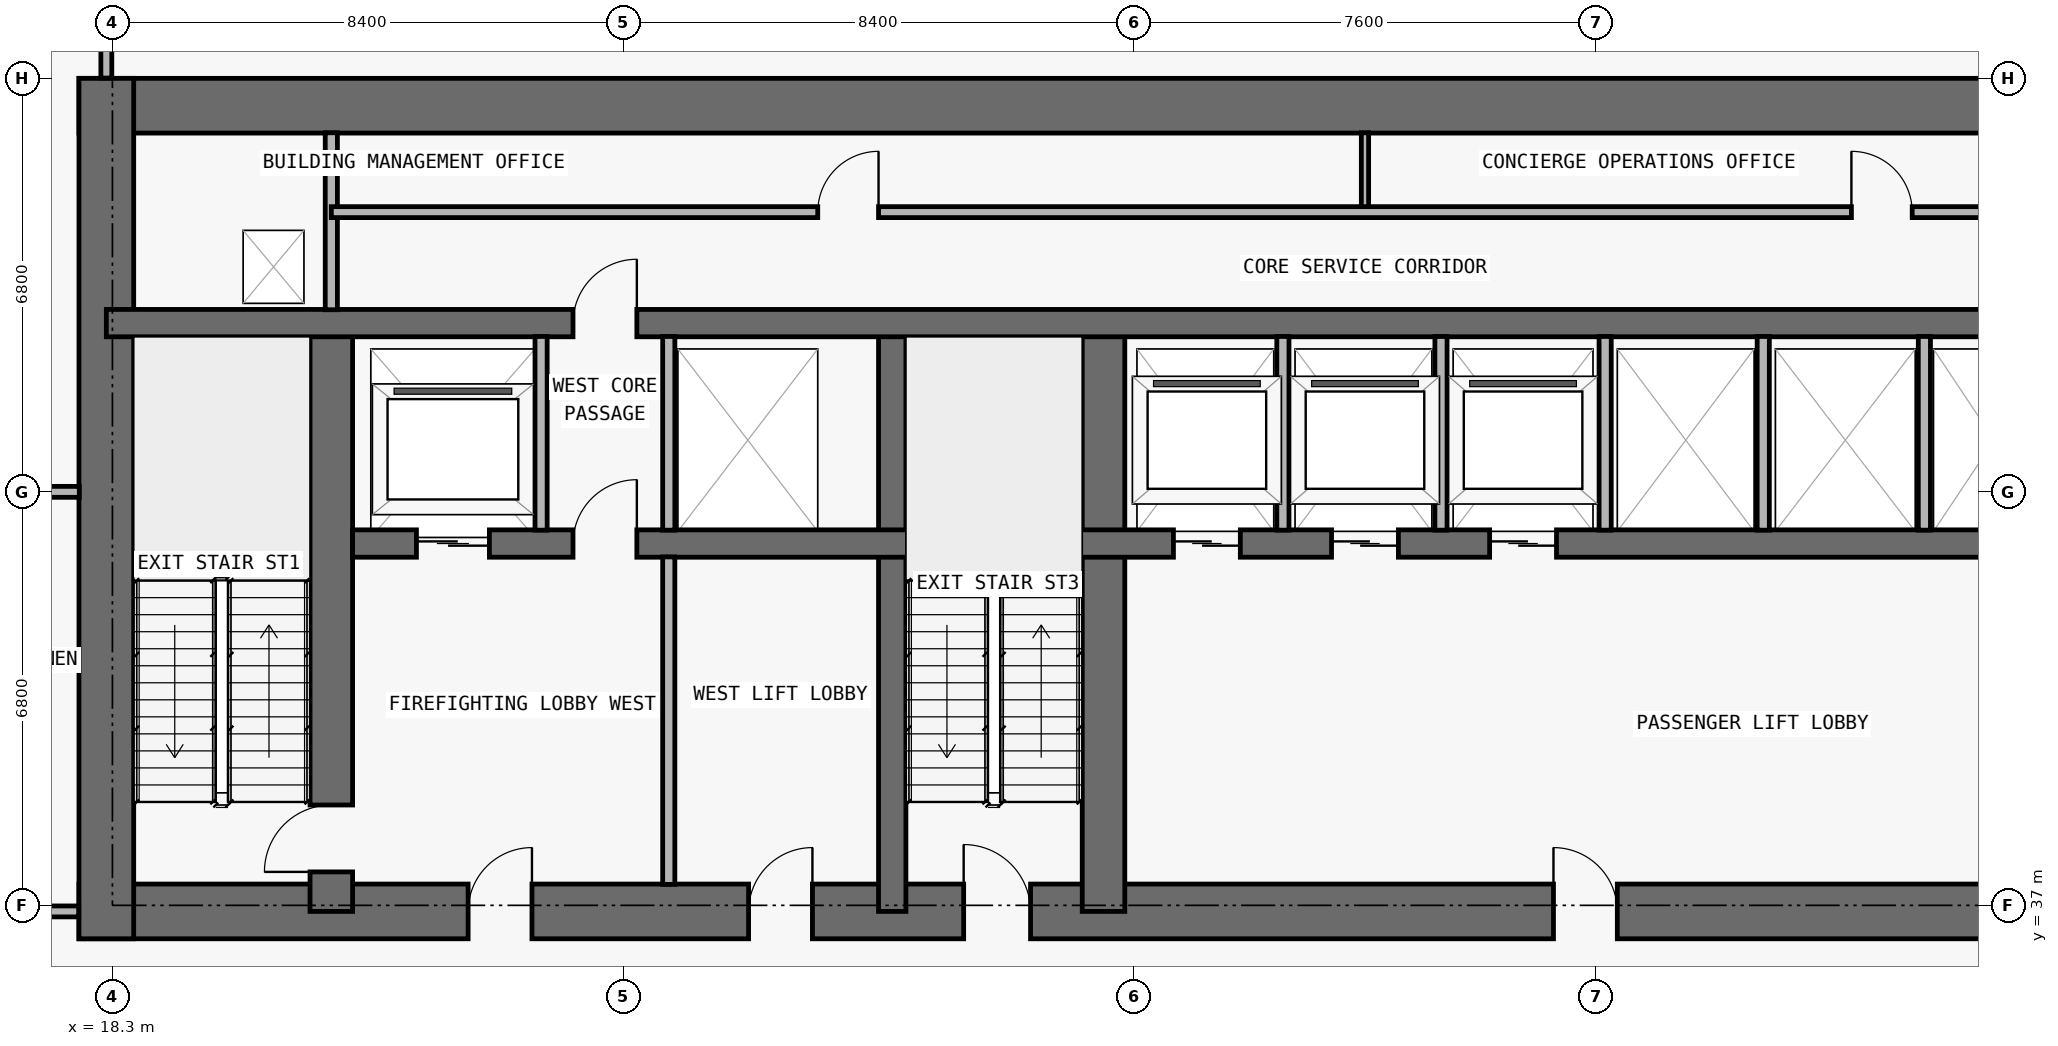
"""IFC4 building model, lengths in metres.
Left out: names, types, materials, properties, quantities, classifications, styles, units other than length and angle.
Written with IfcOpenShell. Run it as: python <this file> out.ifc"""

import sys

from ifc_helpers import new_model, si_unit, direction, frame, frame_2d, origin, place, context, subcontext, project, spatial, rectangle, extrude, element, fill, save


model = new_model("IFC4")
c1 = context("Model", 3, precision=1e-05, world=origin(), true_north=direction((0.0, 1.0)))
c2 = subcontext(c1, "Body", "Model", "MODEL_VIEW")
j1 = project(units=[si_unit("LENGTHUNIT", "METRE"), si_unit("PLANEANGLEUNIT", "RADIAN")], contexts=[c1])
p1 = place(None, origin())
s1 = spatial("IfcSite", under=j1, at=p1, CompositionType="ELEMENT")
p2 = place(p1, origin())
s2 = spatial("IfcBuilding", under=s1, at=p2, CompositionType="ELEMENT")
p3 = place(p2, frame((0.0, 0.0, 5.4)))
s3 = spatial("IfcBuildingStorey", under=s2, at=p3, CompositionType="ELEMENT", Elevation=5.4)
p4 = place(p3, frame((17.75, 36.9, 0.0), z_axis=(0.0, 0.0, 1.0), x_axis=(1.0, 0.0, 0.0)))
e1 = element("IfcWall", 1, at=p4, inside=s3, PredefinedType="SHEAR", context=c2, shape_type="SweptSolid", body=[
    extrude(rectangle(XDim=42.3, YDim=0.9, at=frame_2d((21.15, 0.0))), origin(), (0.0, 0.0, 1.0), 4.5),
])
p5 = place(p4, frame((14.55, 0.0, 0.0)))
e2 = element("IfcOpeningElement", 2, at=p5, cuts=e1, PredefinedType="OPENING", context=c2, shape_type="SweptSolid", body=[
    extrude(rectangle(XDim=1.1, YDim=2.15, at=frame_2d((0.55, 1.075))), frame((0.0, 0.46, 0.0), z_axis=(0.0, -1.0, 0.0), x_axis=(1.0, 0.0, 0.0)), (0.0, 0.0, 1.0), 0.92),
])
p6 = place(p4, frame((6.4, 0.0, 0.0)))
e3 = element("IfcOpeningElement", 3, at=p6, cuts=e1, PredefinedType="OPENING", context=c2, shape_type="SweptSolid", body=[
    extrude(rectangle(XDim=1.05, YDim=2.15, at=frame_2d((0.525, 1.075))), frame((0.0, 0.46, 0.0), z_axis=(0.0, -1.0, 0.0), x_axis=(1.0, 0.0, 0.0)), (0.0, 0.0, 1.0), 0.92),
])
p7 = place(p4, frame((34.9, 0.0, 0.0)))
e4 = element("IfcOpeningElement", 4, at=p7, cuts=e1, PredefinedType="OPENING", context=c2, shape_type="SweptSolid", body=[
    extrude(rectangle(XDim=1.05, YDim=2.15, at=frame_2d((0.525, 1.075))), frame((0.0, 0.46, 0.0), z_axis=(0.0, -1.0, 0.0), x_axis=(1.0, 0.0, 0.0)), (0.0, 0.0, 1.0), 0.92),
])
p8 = place(p4, frame((11.012, 0.0, 0.0)))
e5 = element("IfcOpeningElement", 5, at=p8, cuts=e1, PredefinedType="OPENING", context=c2, shape_type="SweptSolid", body=[
    extrude(rectangle(XDim=1.05, YDim=2.15, at=frame_2d((0.525, 1.075))), frame((0.0, 0.46, 0.0), z_axis=(0.0, -1.0, 0.0), x_axis=(1.0, 0.0, 0.0)), (0.0, 0.0, 1.0), 0.92),
])
p9 = place(p4, frame((24.25, 0.0, 0.0)))
e6 = element("IfcOpeningElement", 6, at=p9, cuts=e1, PredefinedType="OPENING", context=c2, shape_type="SweptSolid", body=[
    extrude(rectangle(XDim=1.05, YDim=2.15, at=frame_2d((0.525, 1.075))), frame((0.0, 0.46, 0.0), z_axis=(0.0, -1.0, 0.0), x_axis=(1.0, 0.0, 0.0)), (0.0, 0.0, 1.0), 0.92),
])
p10 = place(p3, frame((17.75, 50.15, 0.0), z_axis=(0.0, 0.0, 1.0), x_axis=(1.0, 0.0, 0.0)))
e7 = element("IfcWall", 7, at=p10, inside=s3, PredefinedType="SHEAR", context=c2, shape_type="SweptSolid", body=[
    extrude(rectangle(XDim=42.3, YDim=0.9, at=frame_2d((21.15, 0.0))), origin(), (0.0, 0.0, 1.0), 4.5),
])
p11 = place(p3, frame((18.2, 36.45, 0.0), z_axis=(0.0, 0.0, 1.0), x_axis=(0.0, 1.0, 0.0)))
e8 = element("IfcWall", 8, at=p11, inside=s3, PredefinedType="SHEAR", context=c2, shape_type="SweptSolid", body=[
    extrude(rectangle(XDim=14.15, YDim=0.9, at=frame_2d((7.075, 0.0))), origin(), (0.0, 0.0, 1.0), 4.5),
])
p12 = place(p3, frame((21.9, 36.9, 0.0), z_axis=(0.0, 0.0, 1.0), x_axis=(0.0, 1.0, 0.0)))
e9 = element("IfcWall", 9, at=p12, inside=s3, PredefinedType="SHEAR", context=c2, shape_type="SweptSolid", body=[
    extrude(rectangle(XDim=9.675, YDim=0.7, at=frame_2d((4.837, 0.0))), origin(), (0.0, 0.0, 1.0), 4.5),
])
p13 = place(p12, frame((0.65, 0.0, 0.0)))
e10 = element("IfcOpeningElement", 10, at=p13, cuts=e9, PredefinedType="OPENING", context=c2, shape_type="SweptSolid", body=[
    extrude(rectangle(XDim=1.1, YDim=2.15, at=frame_2d((0.55, 1.075))), frame((0.0, 0.36, 0.0), z_axis=(0.0, -1.0, 0.0), x_axis=(1.0, 0.0, 0.0)), (0.0, 0.0, 1.0), 0.72),
])
p14 = place(p3, frame((31.125, 36.9, 0.0), z_axis=(0.0, 0.0, 1.0), x_axis=(0.0, 1.0, 0.0)))
e11 = element("IfcWall", 11, at=p14, inside=s3, PredefinedType="SHEAR", context=c2, shape_type="SweptSolid", body=[
    extrude(rectangle(XDim=9.675, YDim=0.45, at=frame_2d((4.837, 0.0))), origin(), (0.0, 0.0, 1.0), 4.5),
])
p15 = place(p3, frame((34.6, 36.9, 0.0), z_axis=(0.0, 0.0, 1.0), x_axis=(0.0, 1.0, 0.0)))
e12 = element("IfcWall", 12, at=p15, inside=s3, PredefinedType="SHEAR", context=c2, shape_type="SweptSolid", body=[
    extrude(rectangle(XDim=9.675, YDim=0.7, at=frame_2d((4.837, 0.0))), origin(), (0.0, 0.0, 1.0), 4.5),
])
p16 = place(p3, frame((22.25, 42.95, 0.0), z_axis=(0.0, 0.0, 1.0), x_axis=(1.0, 0.0, 0.0)))
e13 = element("IfcWall", 13, at=p16, inside=s3, PredefinedType="SHEAR", context=c2, shape_type="SweptSolid", body=[
    extrude(rectangle(XDim=33.3, YDim=0.45, at=frame_2d((16.65, 0.0))), origin(), (0.0, 0.0, 1.0), 4.5),
])
p17 = place(p16, frame((1.05, 0.0, 0.0)))
e14 = element("IfcOpeningElement", 14, at=p17, cuts=e13, PredefinedType="OPENING", context=c2, shape_type="SweptSolid", body=[
    extrude(rectangle(XDim=1.2, YDim=2.2, at=frame_2d((0.6, 1.1))), frame((0.0, 0.235, 0.0), z_axis=(0.0, -1.0, 0.0), x_axis=(1.0, 0.0, 0.0)), (0.0, 0.0, 1.0), 0.47),
])
p18 = place(p16, frame((31.05, 0.0, 0.0)))
e15 = element("IfcOpeningElement", 15, at=p18, cuts=e13, PredefinedType="OPENING", context=c2, shape_type="SweptSolid", body=[
    extrude(rectangle(XDim=1.2, YDim=2.2, at=frame_2d((0.6, 1.1))), frame((0.0, 0.235, 0.0), z_axis=(0.0, -1.0, 0.0), x_axis=(1.0, 0.0, 0.0)), (0.0, 0.0, 1.0), 0.47),
])
p19 = place(p16, frame((13.5, 0.0, 0.0)))
e16 = element("IfcOpeningElement", 16, at=p19, cuts=e13, PredefinedType="OPENING", context=c2, shape_type="SweptSolid", body=[
    extrude(rectangle(XDim=1.1, YDim=2.2, at=frame_2d((0.55, 1.1))), frame((0.0, 0.235, 0.0), z_axis=(0.0, -1.0, 0.0), x_axis=(1.0, 0.0, 0.0)), (0.0, 0.0, 1.0), 0.47),
])
p20 = place(p16, frame((16.1, 0.0, 0.0)))
e17 = element("IfcOpeningElement", 17, at=p20, cuts=e13, PredefinedType="OPENING", context=c2, shape_type="SweptSolid", body=[
    extrude(rectangle(XDim=1.1, YDim=2.2, at=frame_2d((0.55, 1.1))), frame((0.0, 0.235, 0.0), z_axis=(0.0, -1.0, 0.0), x_axis=(1.0, 0.0, 0.0)), (0.0, 0.0, 1.0), 0.47),
])
p21 = place(p16, frame((18.7, 0.0, 0.0)))
e18 = element("IfcOpeningElement", 18, at=p21, cuts=e13, PredefinedType="OPENING", context=c2, shape_type="SweptSolid", body=[
    extrude(rectangle(XDim=1.1, YDim=2.2, at=frame_2d((0.55, 1.1))), frame((0.0, 0.235, 0.0), z_axis=(0.0, -1.0, 0.0), x_axis=(1.0, 0.0, 0.0)), (0.0, 0.0, 1.0), 0.47),
])
p22 = place(p16, frame((3.625, 0.0, 0.0)))
e19 = element("IfcOpeningElement", 19, at=p22, cuts=e13, PredefinedType="OPENING", context=c2, shape_type="SweptSolid", body=[
    extrude(rectangle(XDim=1.05, YDim=2.15, at=frame_2d((0.525, 1.075))), frame((0.0, 0.235, 0.0), z_axis=(0.0, -1.0, 0.0), x_axis=(1.0, 0.0, 0.0)), (0.0, 0.0, 1.0), 0.47),
])
p23 = place(p16, frame((28.675, 0.0, 0.0)))
e20 = element("IfcOpeningElement", 20, at=p23, cuts=e13, PredefinedType="OPENING", context=c2, shape_type="SweptSolid", body=[
    extrude(rectangle(XDim=1.05, YDim=2.15, at=frame_2d((0.525, 1.075))), frame((0.0, 0.235, 0.0), z_axis=(0.0, -1.0, 0.0), x_axis=(1.0, 0.0, 0.0)), (0.0, 0.0, 1.0), 0.47),
])
p24 = place(p3, frame((18.2, 46.575, 0.0), z_axis=(0.0, 0.0, 1.0), x_axis=(1.0, 0.0, 0.0)))
e21 = element("IfcWall", 21, at=p24, inside=s3, PredefinedType="SHEAR", context=c2, shape_type="SweptSolid", body=[
    extrude(rectangle(XDim=41.4, YDim=0.45, at=frame_2d((20.7, 0.0))), origin(), (0.0, 0.0, 1.0), 4.5),
])
p25 = place(p24, frame((7.675, 0.0, 0.0)))
e22 = element("IfcOpeningElement", 22, at=p25, cuts=e21, PredefinedType="OPENING", context=c2, shape_type="SweptSolid", body=[
    extrude(rectangle(XDim=1.05, YDim=2.15, at=frame_2d((0.525, 1.075))), frame((0.0, 0.235, 0.0), z_axis=(0.0, -1.0, 0.0), x_axis=(1.0, 0.0, 0.0)), (0.0, 0.0, 1.0), 0.47),
])
p26 = place(p24, frame((32.725, 0.0, 0.0)))
e23 = element("IfcOpeningElement", 23, at=p26, cuts=e21, PredefinedType="OPENING", context=c2, shape_type="SweptSolid", body=[
    extrude(rectangle(XDim=1.05, YDim=2.15, at=frame_2d((0.525, 1.075))), frame((0.0, 0.235, 0.0), z_axis=(0.0, -1.0, 0.0), x_axis=(1.0, 0.0, 0.0)), (0.0, 0.0, 1.0), 0.47),
])
p27 = place(p3, frame((18.2, 50.605, 0.0), z_axis=(0.0, 0.0, 1.0), x_axis=(0.0, 1.0, 0.0)))
e24 = element("IfcWall", 24, at=p27, inside=s3, PredefinedType="PARTITIONING", context=c2, shape_type="SweptSolid", body=[
    extrude(rectangle(XDim=2.9, YDim=0.18, at=frame_2d((1.45, 0.0))), origin(), (0.0, 0.0, 1.0), 4.5),
])
p28 = place(p3, frame((21.9, 46.795, 0.0), z_axis=(0.0, 0.0, 1.0), x_axis=(0.0, 1.0, 0.0)))
e25 = element("IfcWall", 25, at=p28, inside=s3, PredefinedType="PARTITIONING", context=c2, shape_type="SweptSolid", body=[
    extrude(rectangle(XDim=2.91, YDim=0.2, at=frame_2d((1.455, 0.0))), origin(), (0.0, 0.0, 1.0), 4.5),
])
p29 = place(p3, frame((25.35, 43.17, 0.0), z_axis=(0.0, 0.0, 1.0), x_axis=(0.0, 1.0, 0.0)))
e26 = element("IfcWall", 26, at=p29, inside=s3, PredefinedType="PARTITIONING", context=c2, shape_type="SweptSolid", body=[
    extrude(rectangle(XDim=3.185, YDim=0.2, at=frame_2d((1.593, 0.0))), origin(), (0.0, 0.0, 1.0), 4.5),
])
p30 = place(p3, frame((27.45, 37.345, 0.0), z_axis=(0.0, 0.0, 1.0), x_axis=(0.0, 1.0, 0.0)))
e27 = element("IfcWall", 27, at=p30, inside=s3, PredefinedType="PARTITIONING", context=c2, shape_type="SweptSolid", body=[
    extrude(rectangle(XDim=5.385, YDim=0.2, at=frame_2d((2.692, 0.0))), origin(), (0.0, 0.0, 1.0), 4.5),
])
for number, where, z_axis, x_axis in (
    (28, (27.45, 43.17, 0.0), (0.0, 0.0, 1.0), (0.0, 1.0, 0.0)),
    (29, (37.55, 43.17, 0.0), (0.0, 0.0, 1.0), (0.0, 1.0, 0.0)),
):
    element("IfcWall", number, at=place(p3, frame(where, z_axis=z_axis, x_axis=x_axis)), inside=s3, PredefinedType="PARTITIONING", context=c2, shape_type="SweptSolid", body=[
        extrude(rectangle(XDim=3.185, YDim=0.2, at=frame_2d((1.593, 0.0))), origin(), (0.0, 0.0, 1.0), 4.5),
    ])
p31 = place(p3, frame((38.9, 48.4, 0.0), z_axis=(0.0, 0.0, 1.0), x_axis=(0.0, 1.0, 0.0)))
e30 = element("IfcWall", 30, at=p31, inside=s3, PredefinedType="PARTITIONING", context=c2, shape_type="SweptSolid", body=[
    extrude(rectangle(XDim=1.305, YDim=0.12, at=frame_2d((0.653, 0.0))), origin(), (0.0, 0.0, 1.0), 4.5),
])
for number, where, z_axis, x_axis in (
    (31, (40.15, 43.17, 0.0), (0.0, 0.0, 1.0), (0.0, 1.0, 0.0)),
    (32, (42.85, 43.17, 0.0), (0.0, 0.0, 1.0), (0.0, 1.0, 0.0)),
    (33, (45.45, 43.17, 0.0), (0.0, 0.0, 1.0), (0.0, 1.0, 0.0)),
    (34, (48.1, 43.17, 0.0), (0.0, 0.0, 1.0), (0.0, 1.0, 0.0)),
):
    element("IfcWall", number, at=place(p3, frame(where, z_axis=z_axis, x_axis=x_axis)), inside=s3, PredefinedType="PARTITIONING", context=c2, shape_type="SweptSolid", body=[
        extrude(rectangle(XDim=3.185, YDim=0.2, at=frame_2d((1.593, 0.0))), origin(), (0.0, 0.0, 1.0), 4.5),
    ])
p32 = place(p3, frame((0.295, 36.9, 0.0), z_axis=(0.0, 0.0, 1.0), x_axis=(1.0, 0.0, 0.0)))
e35 = element("IfcWall", 35, at=p32, inside=s3, PredefinedType="PARTITIONING", context=c2, shape_type="SweptSolid", body=[
    extrude(rectangle(XDim=17.45, YDim=0.18, at=frame_2d((8.725, 0.0))), origin(), (0.0, 0.0, 1.0), 4.5),
])
p33 = place(p32, frame((4.377, 0.0, 0.0)))
e36 = element("IfcOpeningElement", 36, at=p33, cuts=e35, PredefinedType="OPENING", context=c2, shape_type="SweptSolid", body=[
    extrude(rectangle(XDim=0.85, YDim=2.1, at=frame_2d((0.425, 1.05))), frame((0.0, 0.1, 0.0), z_axis=(0.0, -1.0, 0.0), x_axis=(1.0, 0.0, 0.0)), (0.0, 0.0, 1.0), 0.2),
])
p34 = place(p32, frame((11.33, 0.0, 0.0)))
e37 = element("IfcOpeningElement", 37, at=p34, cuts=e35, PredefinedType="OPENING", context=c2, shape_type="SweptSolid", body=[
    extrude(rectangle(XDim=0.85, YDim=2.1, at=frame_2d((0.425, 1.05))), frame((0.0, 0.1, 0.0), z_axis=(0.0, -1.0, 0.0), x_axis=(1.0, 0.0, 0.0)), (0.0, 0.0, 1.0), 0.2),
])
p35 = place(p32, frame((15.228, 0.0, 0.0)))
e38 = element("IfcOpeningElement", 38, at=p35, cuts=e35, PredefinedType="OPENING", context=c2, shape_type="SweptSolid", body=[
    extrude(rectangle(XDim=0.9, YDim=2.15, at=frame_2d((0.45, 1.075))), frame((0.0, 0.1, 0.0), z_axis=(0.0, -1.0, 0.0), x_axis=(1.0, 0.0, 0.0)), (0.0, 0.0, 1.0), 0.2),
])
p36 = place(p3, frame((0.295, 43.8, 0.0), z_axis=(0.0, 0.0, 1.0), x_axis=(1.0, 0.0, 0.0)))
e39 = element("IfcWall", 39, at=p36, inside=s3, PredefinedType="PARTITIONING", context=c2, shape_type="SweptSolid", body=[
    extrude(rectangle(XDim=17.46, YDim=0.18, at=frame_2d((8.73, 0.0))), origin(), (0.0, 0.0, 1.0), 3.789),
])
p37 = place(p36, frame((15.083, 0.0, 0.0)))
e40 = element("IfcOpeningElement", 40, at=p37, cuts=e39, PredefinedType="OPENING", context=c2, shape_type="SweptSolid", body=[
    extrude(rectangle(XDim=1.2, YDim=2.2, at=frame_2d((0.6, 1.1))), frame((0.0, 0.1, 0.0), z_axis=(0.0, -1.0, 0.0), x_axis=(1.0, 0.0, 0.0)), (0.0, 0.0, 1.0), 0.2),
])
p38 = place(p3, frame((21.9, 48.4, 0.0), z_axis=(0.0, 0.0, 1.0), x_axis=(1.0, 0.0, 0.0)))
e41 = element("IfcWall", 41, at=p38, inside=s3, PredefinedType="PARTITIONING", context=c2, shape_type="SweptSolid", body=[
    extrude(rectangle(XDim=34.0, YDim=0.18, at=frame_2d((17.0, 0.0))), origin(), (0.0, 0.0, 1.0), 4.5),
])
p39 = place(p38, frame((8.0, 0.0, 0.0)))
e42 = element("IfcOpeningElement", 42, at=p39, cuts=e41, PredefinedType="OPENING", context=c2, shape_type="SweptSolid", body=[
    extrude(rectangle(XDim=1.0, YDim=2.2, at=frame_2d((0.5, 1.1))), frame((0.0, 0.1, 0.0), z_axis=(0.0, -1.0, 0.0), x_axis=(1.0, 0.0, 0.0)), (0.0, 0.0, 1.0), 0.2),
])
p40 = place(p38, frame((25.0, 0.0, 0.0)))
e43 = element("IfcOpeningElement", 43, at=p40, cuts=e41, PredefinedType="OPENING", context=c2, shape_type="SweptSolid", body=[
    extrude(rectangle(XDim=1.0, YDim=2.2, at=frame_2d((0.5, 1.1))), frame((0.0, 0.1, 0.0), z_axis=(0.0, -1.0, 0.0), x_axis=(1.0, 0.0, 0.0)), (0.0, 0.0, 1.0), 0.2),
])
p41 = place(p17, origin())
e44 = element("IfcDoor", 44, at=p41, inside=s3, OperationType="DOUBLE_DOOR_SLIDING", PredefinedType="DOOR", context=c2, shape_type="SweptSolid", body=[
    extrude(rectangle(XDim=1.2, YDim=2.2, at=frame_2d((0.6, 1.1))), frame((0.0, 0.025, 0.0), z_axis=(0.0, -1.0, 0.0), x_axis=(1.0, 0.0, 0.0)), (0.0, 0.0, 1.0), 0.05),
])
fill(e14, e44)
p42 = place(p19, origin())
e45 = element("IfcDoor", 45, at=p42, inside=s3, OperationType="DOUBLE_DOOR_SLIDING", PredefinedType="DOOR", context=c2, shape_type="SweptSolid", body=[
    extrude(rectangle(XDim=1.1, YDim=2.2, at=frame_2d((0.55, 1.1))), frame((0.0, 0.025, 0.0), z_axis=(0.0, -1.0, 0.0), x_axis=(1.0, 0.0, 0.0)), (0.0, 0.0, 1.0), 0.05),
])
fill(e16, e45)
p43 = place(p20, origin())
e46 = element("IfcDoor", 46, at=p43, inside=s3, OperationType="DOUBLE_DOOR_SLIDING", PredefinedType="DOOR", context=c2, shape_type="SweptSolid", body=[
    extrude(rectangle(XDim=1.1, YDim=2.2, at=frame_2d((0.55, 1.1))), frame((0.0, 0.025, 0.0), z_axis=(0.0, -1.0, 0.0), x_axis=(1.0, 0.0, 0.0)), (0.0, 0.0, 1.0), 0.05),
])
fill(e17, e46)
p44 = place(p21, origin())
e47 = element("IfcDoor", 47, at=p44, inside=s3, OperationType="DOUBLE_DOOR_SLIDING", PredefinedType="DOOR", context=c2, shape_type="SweptSolid", body=[
    extrude(rectangle(XDim=1.1, YDim=2.2, at=frame_2d((0.55, 1.1))), frame((0.0, 0.025, 0.0), z_axis=(0.0, -1.0, 0.0), x_axis=(1.0, 0.0, 0.0)), (0.0, 0.0, 1.0), 0.05),
])
fill(e18, e47)
p45 = place(p5, origin())
e48 = element("IfcDoor", 48, at=p45, inside=s3, OperationType="SINGLE_SWING_LEFT", PredefinedType="DOOR", context=c2, shape_type="SweptSolid", body=[
    extrude(rectangle(XDim=1.1, YDim=2.15, at=frame_2d((0.55, 1.075))), frame((0.0, 0.025, 0.0), z_axis=(0.0, -1.0, 0.0), x_axis=(1.0, 0.0, 0.0)), (0.0, 0.0, 1.0), 0.05),
])
fill(e2, e48)
p46 = place(p6, origin())
e49 = element("IfcDoor", 49, at=p46, inside=s3, OperationType="SINGLE_SWING_RIGHT", PredefinedType="DOOR", context=c2, shape_type="SweptSolid", body=[
    extrude(rectangle(XDim=1.05, YDim=2.15, at=frame_2d((0.525, 1.075))), frame((0.0, 0.025, 0.0), z_axis=(0.0, -1.0, 0.0), x_axis=(1.0, 0.0, 0.0)), (0.0, 0.0, 1.0), 0.05),
])
fill(e3, e49)
p47 = place(p13, origin())
e50 = element("IfcDoor", 50, at=p47, inside=s3, OperationType="SINGLE_SWING_LEFT", PredefinedType="DOOR", context=c2, shape_type="SweptSolid", body=[
    extrude(rectangle(XDim=1.1, YDim=2.15, at=frame_2d((0.55, 1.075))), frame((0.0, 0.025, 0.0), z_axis=(0.0, -1.0, 0.0), x_axis=(1.0, 0.0, 0.0)), (0.0, 0.0, 1.0), 0.05),
])
fill(e10, e50)
p48 = place(p22, origin())
e51 = element("IfcDoor", 51, at=p48, inside=s3, OperationType="SINGLE_SWING_RIGHT", PredefinedType="DOOR", context=c2, shape_type="SweptSolid", body=[
    extrude(rectangle(XDim=1.05, YDim=2.15, at=frame_2d((0.525, 1.075))), frame((0.0, 0.025, 0.0), z_axis=(0.0, -1.0, 0.0), x_axis=(1.0, 0.0, 0.0)), (0.0, 0.0, 1.0), 0.05),
])
fill(e19, e51)
p49 = place(p8, origin())
e52 = element("IfcDoor", 52, at=p49, inside=s3, OperationType="SINGLE_SWING_RIGHT", PredefinedType="DOOR", context=c2, shape_type="SweptSolid", body=[
    extrude(rectangle(XDim=1.05, YDim=2.15, at=frame_2d((0.525, 1.075))), frame((0.0, 0.025, 0.0), z_axis=(0.0, -1.0, 0.0), x_axis=(1.0, 0.0, 0.0)), (0.0, 0.0, 1.0), 0.05),
])
fill(e5, e52)
p50 = place(p9, origin())
e53 = element("IfcDoor", 53, at=p50, inside=s3, OperationType="SINGLE_SWING_LEFT", PredefinedType="DOOR", context=c2, shape_type="SweptSolid", body=[
    extrude(rectangle(XDim=1.05, YDim=2.15, at=frame_2d((0.525, 1.075))), frame((0.0, 0.025, 0.0), z_axis=(0.0, -1.0, 0.0), x_axis=(1.0, 0.0, 0.0)), (0.0, 0.0, 1.0), 0.05),
])
fill(e6, e53)
p51 = place(p25, origin())
e54 = element("IfcDoor", 54, at=p51, inside=s3, OperationType="SINGLE_SWING_RIGHT", PredefinedType="DOOR", context=c2, shape_type="SweptSolid", body=[
    extrude(rectangle(XDim=1.05, YDim=2.15, at=frame_2d((0.525, 1.075))), frame((0.0, 0.025, 0.0), z_axis=(0.0, -1.0, 0.0), x_axis=(1.0, 0.0, 0.0)), (0.0, 0.0, 1.0), 0.05),
])
fill(e22, e54)
p52 = place(p39, origin())
e55 = element("IfcDoor", 55, at=p52, inside=s3, OperationType="SINGLE_SWING_RIGHT", PredefinedType="DOOR", context=c2, shape_type="SweptSolid", body=[
    extrude(rectangle(XDim=1.0, YDim=2.2, at=frame_2d((0.5, 1.1))), frame((0.0, 0.025, 0.0), z_axis=(0.0, -1.0, 0.0), x_axis=(1.0, 0.0, 0.0)), (0.0, 0.0, 1.0), 0.05),
])
fill(e42, e55)
p53 = place(p40, origin())
e56 = element("IfcDoor", 56, at=p53, inside=s3, OperationType="SINGLE_SWING_LEFT", PredefinedType="DOOR", context=c2, shape_type="SweptSolid", body=[
    extrude(rectangle(XDim=1.0, YDim=2.2, at=frame_2d((0.5, 1.1))), frame((0.0, 0.025, 0.0), z_axis=(0.0, -1.0, 0.0), x_axis=(1.0, 0.0, 0.0)), (0.0, 0.0, 1.0), 0.05),
])
fill(e43, e56)
save(model, sys.argv[1])
